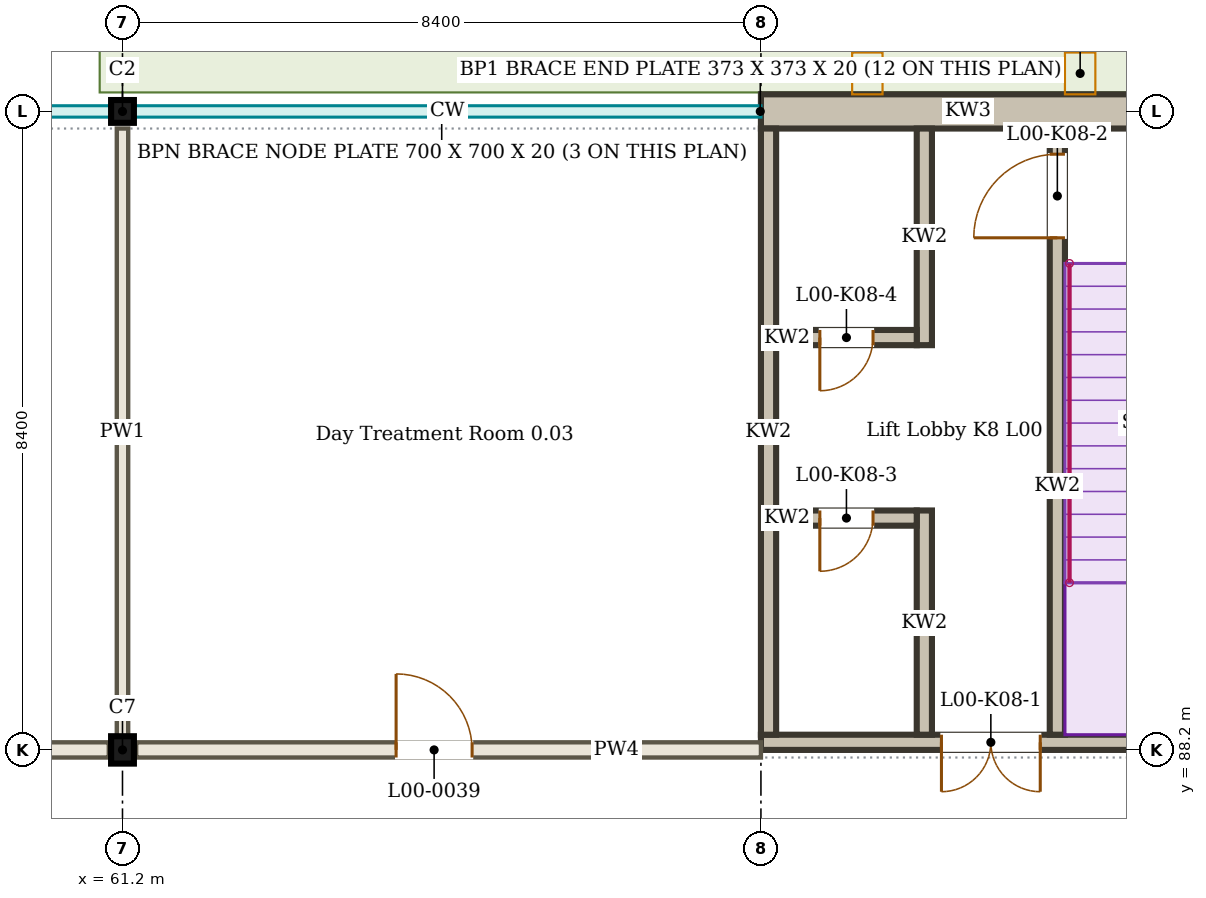
"""IFC4 building model, lengths in metres.
Left out: names, types, materials, properties, quantities, classifications, styles, units other than length and angle.
Written with IfcOpenShell. Run it as: python <this file> out.ifc"""

import sys

from ifc_helpers import new_model, si_unit, direction, frame, frame_2d, origin, origin_2d, place, context, subcontext, project, spatial, rectangle, i_section, extrude, element, fill, save


model = new_model("IFC4")
c1 = context("Model", 3, precision=1e-05, world=origin(), true_north=direction((0.0, 1.0)))
c2 = subcontext(c1, "Body", "Model", "MODEL_VIEW")
j1 = project(units=[si_unit("LENGTHUNIT", "METRE"), si_unit("PLANEANGLEUNIT", "RADIAN")], contexts=[c1])
p1 = place(None, origin())
s1 = spatial("IfcSite", under=j1, at=p1, CompositionType="ELEMENT")
p2 = place(p1, origin())
s2 = spatial("IfcBuilding", under=s1, at=p2, CompositionType="ELEMENT")
p3 = place(p2, origin())
s3 = spatial("IfcBuildingStorey", under=s2, at=p3, CompositionType="ELEMENT", Elevation=0.0)
p4 = place(p3, frame((61.2, 88.2, 0.0), z_axis=(0.0, 0.0, 1.0), x_axis=(1.0, 0.0, 0.0)))
e1 = element("IfcColumn", 1, at=p4, inside=s3, PredefinedType="COLUMN", context=c2, shape_type="SweptSolid", body=[
    extrude(i_section(OverallWidth=0.3, OverallDepth=0.36, WebThickness=0.012, FlangeThickness=0.022, FilletRadius=0.027, at=origin_2d()), origin(), (0.0, 0.0, 1.0), 4.5),
])
p5 = place(p3, frame((61.2, 96.6, 0.0), z_axis=(0.0, 0.0, 1.0), x_axis=(1.0, 0.0, 0.0)))
e2 = element("IfcColumn", 2, at=p5, inside=s3, PredefinedType="COLUMN", context=c2, shape_type="SweptSolid", body=[
    extrude(i_section(OverallWidth=0.3, OverallDepth=0.3, WebThickness=0.011, FlangeThickness=0.019, FilletRadius=0.027, at=origin_2d()), origin(), (0.0, 0.0, 1.0), 4.5),
])
p6 = place(p3, frame((52.98, 88.2, 0.0), z_axis=(0.0, 0.0, 1.0), x_axis=(1.0, 0.0, 0.0)))
e3 = element("IfcWall", 3, at=p6, inside=s3, PredefinedType="PARTITIONING", context=c2, shape_type="SweptSolid", body=[
    extrude(rectangle(XDim=8.04, YDim=0.2, at=frame_2d((4.02, 0.0))), origin(), (0.0, 0.0, 1.0), 3.8),
])
p7 = place(p6, frame((3.42, 0.0, 0.0)))
e4 = element("IfcOpeningElement", 4, at=p7, cuts=e3, PredefinedType="OPENING", context=c2, shape_type="SweptSolid", body=[
    extrude(rectangle(XDim=1.0, YDim=2.1, at=frame_2d((0.5, 1.05))), frame((0.0, 0.11, 0.0), z_axis=(0.0, -1.0, 0.0), x_axis=(1.0, 0.0, 0.0)), (0.0, 0.0, 1.0), 0.22),
])
p8 = place(p3, frame((61.38, 88.2, 0.0), z_axis=(0.0, 0.0, 1.0), x_axis=(1.0, 0.0, 0.0)))
e5 = element("IfcWall", 5, at=p8, inside=s3, PredefinedType="PARTITIONING", context=c2, shape_type="SweptSolid", body=[
    extrude(rectangle(XDim=8.22, YDim=0.2, at=frame_2d((4.11, 0.0))), origin(), (0.0, 0.0, 1.0), 3.8),
])
p9 = place(p8, frame((3.42, 0.0, 0.0)))
e6 = element("IfcOpeningElement", 6, at=p9, cuts=e5, PredefinedType="OPENING", context=c2, shape_type="SweptSolid", body=[
    extrude(rectangle(XDim=1.0, YDim=2.1, at=frame_2d((0.5, 1.05))), frame((0.0, 0.11, 0.0), z_axis=(0.0, -1.0, 0.0), x_axis=(1.0, 0.0, 0.0)), (0.0, 0.0, 1.0), 0.22),
])
p10 = place(p3, frame((61.2, 88.38, 0.0), z_axis=(0.0, 0.0, 1.0), x_axis=(0.0, 1.0, 0.0)))
e7 = element("IfcWall", 7, at=p10, inside=s3, PredefinedType="PARTITIONING", context=c2, shape_type="SweptSolid", body=[
    extrude(rectangle(XDim=7.995, YDim=0.15, at=frame_2d((3.998, 0.0))), origin(), (0.0, 0.0, 1.0), 3.8),
])
p11 = place(p3, frame((78.0, 88.3, 0.0), z_axis=(0.0, 0.0, 1.0), x_axis=(-1.0, 0.0, 0.0)))
e8 = element("IfcWall", 8, at=p11, inside=s3, PredefinedType="SOLIDWALL", context=c2, shape_type="SweptSolid", body=[
    extrude(rectangle(XDim=8.4, YDim=0.2, at=frame_2d((4.2, 0.0))), origin(), (0.0, 0.0, 1.0), 4.5),
])
p12 = place(p11, frame((4.725, 0.0, 0.0)))
e9 = element("IfcOpeningElement", 9, at=p12, cuts=e8, PredefinedType="OPENING", context=c2, shape_type="SweptSolid", body=[
    extrude(rectangle(XDim=1.3, YDim=2.1, at=frame_2d((0.65, 1.05))), frame((0.0, 0.11, 0.0), z_axis=(0.0, -1.0, 0.0), x_axis=(1.0, 0.0, 0.0)), (0.0, 0.0, 1.0), 0.22),
])
p13 = place(p3, frame((78.0, 96.6, 0.0), z_axis=(0.0, 0.0, 1.0), x_axis=(-1.0, 0.0, 0.0)))
e10 = element("IfcWall", 10, at=p13, inside=s3, PredefinedType="SOLIDWALL", context=c2, shape_type="SweptSolid", body=[
    extrude(rectangle(XDim=8.4, YDim=0.45, at=frame_2d((4.2, 0.0))), origin(), (0.0, 0.0, 1.0), 4.5),
])
p14 = place(p13, frame((1.65, 0.0, 0.0)))
e11 = element("IfcOpeningElement", 11, at=p14, cuts=e10, PredefinedType="OPENING", context=c2, shape_type="SweptSolid", body=[
    extrude(rectangle(XDim=1.3, YDim=2.1, at=frame_2d((0.65, 1.05))), frame((0.0, 0.235, 0.0), z_axis=(0.0, -1.0, 0.0), x_axis=(1.0, 0.0, 0.0)), (0.0, 0.0, 1.0), 0.47),
])
p15 = place(p3, frame((69.7, 88.4, 0.0), z_axis=(0.0, 0.0, 1.0), x_axis=(0.0, 1.0, 0.0)))
e12 = element("IfcWall", 12, at=p15, inside=s3, PredefinedType="SOLIDWALL", context=c2, shape_type="SweptSolid", body=[
    extrude(rectangle(XDim=7.975, YDim=0.2, at=frame_2d((3.988, 0.0))), origin(), (0.0, 0.0, 1.0), 4.5),
])
p16 = place(p3, frame((73.5, 88.4, 0.0), z_axis=(0.0, 0.0, 1.0), x_axis=(0.0, 1.0, 0.0)))
e13 = element("IfcWall", 13, at=p16, inside=s3, PredefinedType="SOLIDWALL", context=c2, shape_type="SweptSolid", body=[
    extrude(rectangle(XDim=7.975, YDim=0.2, at=frame_2d((3.988, 0.0))), origin(), (0.0, 0.0, 1.0), 4.5),
])
p17 = place(p16, frame((6.538, 0.0, 0.0)))
e14 = element("IfcOpeningElement", 14, at=p17, cuts=e13, PredefinedType="OPENING", context=c2, shape_type="SweptSolid", body=[
    extrude(rectangle(XDim=1.1, YDim=2.1, at=frame_2d((0.55, 1.05))), frame((0.0, 0.11, 0.0), z_axis=(0.0, -1.0, 0.0), x_axis=(1.0, 0.0, 0.0)), (0.0, 0.0, 1.0), 0.22),
])
p18 = place(p3, frame((71.75, 88.4, 0.0), z_axis=(0.0, 0.0, 1.0), x_axis=(0.0, 1.0, 0.0)))
e15 = element("IfcWall", 15, at=p18, inside=s3, PredefinedType="SOLIDWALL", context=c2, shape_type="SweptSolid", body=[
    extrude(rectangle(XDim=2.95, YDim=0.2, at=frame_2d((1.475, 0.0))), origin(), (0.0, 0.0, 1.0), 4.35),
])
p19 = place(p3, frame((71.75, 93.525, 0.0), z_axis=(0.0, 0.0, 1.0), x_axis=(0.0, 1.0, 0.0)))
e16 = element("IfcWall", 16, at=p19, inside=s3, PredefinedType="SOLIDWALL", context=c2, shape_type="SweptSolid", body=[
    extrude(rectangle(XDim=2.85, YDim=0.2, at=frame_2d((1.425, 0.0))), origin(), (0.0, 0.0, 1.0), 4.35),
])
p20 = place(p3, frame((71.65, 91.25, 0.0), z_axis=(0.0, 0.0, 1.0), x_axis=(-1.0, 0.0, 0.0)))
e17 = element("IfcWall", 17, at=p20, inside=s3, PredefinedType="SOLIDWALL", context=c2, shape_type="SweptSolid", body=[
    extrude(rectangle(XDim=1.85, YDim=0.2, at=frame_2d((0.925, 0.0))), origin(), (0.0, 0.0, 1.0), 4.35),
])
p21 = place(p20, frame((0.575, 0.0, 0.0)))
e18 = element("IfcOpeningElement", 18, at=p21, cuts=e17, PredefinedType="OPENING", context=c2, shape_type="SweptSolid", body=[
    extrude(rectangle(XDim=0.7, YDim=2.1, at=frame_2d((0.35, 1.05))), frame((0.0, 0.11, 0.0), z_axis=(0.0, -1.0, 0.0), x_axis=(1.0, 0.0, 0.0)), (0.0, 0.0, 1.0), 0.22),
])
p22 = place(p3, frame((71.65, 93.625, 0.0), z_axis=(0.0, 0.0, 1.0), x_axis=(-1.0, 0.0, 0.0)))
e19 = element("IfcWall", 19, at=p22, inside=s3, PredefinedType="SOLIDWALL", context=c2, shape_type="SweptSolid", body=[
    extrude(rectangle(XDim=1.85, YDim=0.2, at=frame_2d((0.925, 0.0))), origin(), (0.0, 0.0, 1.0), 4.35),
])
p23 = place(p22, frame((0.575, 0.0, 0.0)))
e20 = element("IfcOpeningElement", 20, at=p23, cuts=e19, PredefinedType="OPENING", context=c2, shape_type="SweptSolid", body=[
    extrude(rectangle(XDim=0.7, YDim=2.1, at=frame_2d((0.35, 1.05))), frame((0.0, 0.11, 0.0), z_axis=(0.0, -1.0, 0.0), x_axis=(1.0, 0.0, 0.0)), (0.0, 0.0, 1.0), 0.22),
])
p24 = place(p9, origin())
e21 = element("IfcDoor", 21, at=p24, inside=s3, OperationType="SINGLE_SWING_LEFT", PredefinedType="DOOR", context=c2, shape_type="SweptSolid", body=[
    extrude(rectangle(XDim=1.0, YDim=2.1, at=frame_2d((0.5, 1.05))), frame((0.0, 0.025, 0.0), z_axis=(0.0, -1.0, 0.0), x_axis=(1.0, 0.0, 0.0)), (0.0, 0.0, 1.0), 0.05),
])
fill(e6, e21)
p25 = place(p12, origin())
e22 = element("IfcDoor", 22, at=p25, inside=s3, OperationType="DOUBLE_DOOR_DOUBLE_SWING", PredefinedType="DOOR", context=c2, shape_type="SweptSolid", body=[
    extrude(rectangle(XDim=1.3, YDim=2.1, at=frame_2d((0.65, 1.05))), frame((0.0, 0.025, 0.0), z_axis=(0.0, -1.0, 0.0), x_axis=(1.0, 0.0, 0.0)), (0.0, 0.0, 1.0), 0.05),
])
fill(e9, e22)
p26 = place(p17, origin())
e23 = element("IfcDoor", 23, at=p26, inside=s3, OperationType="SINGLE_SWING_LEFT", PredefinedType="DOOR", context=c2, shape_type="SweptSolid", body=[
    extrude(rectangle(XDim=1.1, YDim=2.1, at=frame_2d((0.55, 1.05))), frame((0.0, 0.025, 0.0), z_axis=(0.0, -1.0, 0.0), x_axis=(1.0, 0.0, 0.0)), (0.0, 0.0, 1.0), 0.05),
])
fill(e14, e23)
p27 = place(p21, origin())
e24 = element("IfcDoor", 24, at=p27, inside=s3, OperationType="SINGLE_SWING_RIGHT", PredefinedType="DOOR", context=c2, shape_type="SweptSolid", body=[
    extrude(rectangle(XDim=0.7, YDim=2.1, at=frame_2d((0.35, 1.05))), frame((0.0, 0.025, 0.0), z_axis=(0.0, -1.0, 0.0), x_axis=(1.0, 0.0, 0.0)), (0.0, 0.0, 1.0), 0.05),
])
fill(e18, e24)
p28 = place(p23, origin())
e25 = element("IfcDoor", 25, at=p28, inside=s3, OperationType="SINGLE_SWING_RIGHT", PredefinedType="DOOR", context=c2, shape_type="SweptSolid", body=[
    extrude(rectangle(XDim=0.7, YDim=2.1, at=frame_2d((0.35, 1.05))), frame((0.0, 0.025, 0.0), z_axis=(0.0, -1.0, 0.0), x_axis=(1.0, 0.0, 0.0)), (0.0, 0.0, 1.0), 0.05),
])
fill(e20, e25)
save(model, sys.argv[1])
